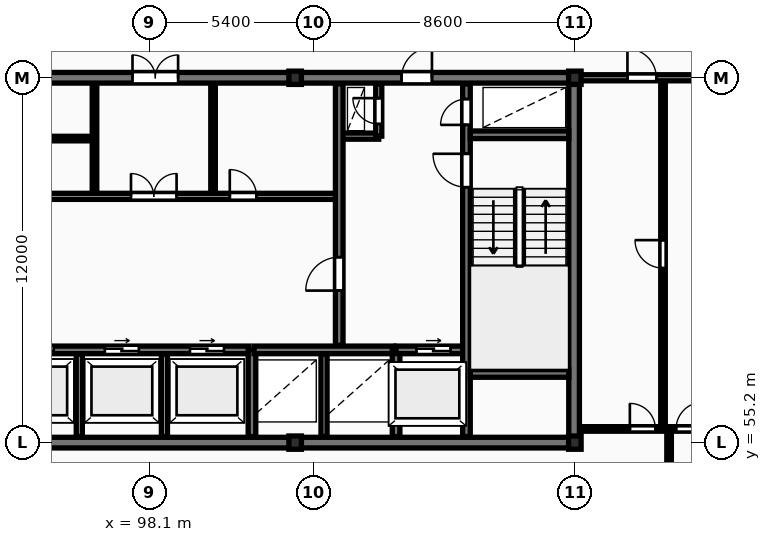
"""IFC4 building model, lengths in metres.
Left out: names, types, materials, properties, quantities, classifications, styles, units other than length and angle.
Written with IfcOpenShell. Run it as: python <this file> out.ifc"""

import sys

from ifc_helpers import new_model, si_unit, direction, frame, frame_2d, origin, origin_2d, place, context, subcontext, project, spatial, rectangle, i_section, extrude, element, fill, save


model = new_model("IFC4")
c1 = context("Model", 3, precision=1e-05, world=origin(), true_north=direction((0.0, 1.0)))
c2 = subcontext(c1, "Body", "Model", "MODEL_VIEW")
j1 = project(units=[si_unit("LENGTHUNIT", "METRE"), si_unit("PLANEANGLEUNIT", "RADIAN")], contexts=[c1])
p1 = place(None, origin())
s1 = spatial("IfcSite", under=j1, at=p1, CompositionType="ELEMENT")
p2 = place(p1, origin())
s2 = spatial("IfcBuilding", under=s1, at=p2, CompositionType="ELEMENT")
p3 = place(p2, frame((0.0, 0.0, 153.7)))
s3 = spatial("IfcBuildingStorey", under=s2, at=p3, CompositionType="ELEMENT", Elevation=153.7)
for number, where, z_axis, x_axis in (
    (1, (102.9, 55.2, 0.0), (0.0, 0.0, 1.0), (1.0, 0.0, 0.0)),
    (2, (102.9, 67.2, 0.0), (0.0, 0.0, 1.0), (1.0, 0.0, 0.0)),
    (3, (112.1, 55.2, 0.0), (0.0, 0.0, 1.0), (1.0, 0.0, 0.0)),
    (4, (112.1, 67.2, 0.0), (0.0, 0.0, 1.0), (1.0, 0.0, 0.0)),
):
    element("IfcColumn", number, at=place(p3, frame(where, z_axis=z_axis, x_axis=x_axis)), inside=s3, PredefinedType="COLUMN", context=c2, shape_type="SweptSolid", body=[
        extrude(i_section(OverallWidth=0.412, OverallDepth=0.437, WebThickness=0.036, FlangeThickness=0.052, FilletRadius=0.015, at=origin_2d()), origin(), (0.0, 0.0, 1.0), 3.6),
    ])
p4 = place(p3, frame((75.95, 55.2, 0.0), z_axis=(0.0, 0.0, 1.0), x_axis=(1.0, 0.0, 0.0)))
e5 = element("IfcWall", 5, at=p4, inside=s3, PredefinedType="SHEAR", context=c2, shape_type="SweptSolid", body=[
    extrude(rectangle(XDim=36.3, YDim=0.35, at=frame_2d((18.15, 0.0))), origin(), (0.0, 0.0, 1.0), 3.6),
])
p5 = place(p4, frame((15.1, 0.0, 0.0)))
e6 = element("IfcOpeningElement", 6, at=p5, cuts=e5, PredefinedType="OPENING", context=c2, shape_type="SweptSolid", body=[
    extrude(rectangle(XDim=1.1, YDim=2.1, at=frame_2d((0.55, 1.05))), frame((0.0, 0.185, 0.0), z_axis=(0.0, -1.0, 0.0), x_axis=(1.0, 0.0, 0.0)), (0.0, 0.0, 1.0), 0.37),
])
p6 = place(p3, frame((112.075, 55.375, 0.0), z_axis=(0.0, 0.0, 1.0), x_axis=(0.0, 1.0, 0.0)))
e7 = element("IfcWall", 7, at=p6, inside=s3, PredefinedType="SHEAR", context=c2, shape_type="SweptSolid", body=[
    extrude(rectangle(XDim=11.65, YDim=0.35, at=frame_2d((5.825, 0.0))), origin(), (0.0, 0.0, 1.0), 3.6),
])
p7 = place(p3, frame((75.95, 67.2, 0.0), z_axis=(0.0, 0.0, 1.0), x_axis=(1.0, 0.0, 0.0)))
e8 = element("IfcWall", 8, at=p7, inside=s3, PredefinedType="SHEAR", context=c2, shape_type="SweptSolid", body=[
    extrude(rectangle(XDim=36.3, YDim=0.35, at=frame_2d((18.15, 0.0))), origin(), (0.0, 0.0, 1.0), 3.6),
])
p8 = place(p7, frame((5.25, 0.0, 0.0)))
e9 = element("IfcOpeningElement", 9, at=p8, cuts=e8, PredefinedType="OPENING", context=c2, shape_type="SweptSolid", body=[
    extrude(rectangle(XDim=1.0, YDim=2.15, at=frame_2d((0.5, 1.075))), frame((0.0, 0.185, 0.0), z_axis=(0.0, -1.0, 0.0), x_axis=(1.0, 0.0, 0.0)), (0.0, 0.0, 1.0), 0.37),
])
p9 = place(p7, frame((21.6, 0.0, 0.0)))
e10 = element("IfcOpeningElement", 10, at=p9, cuts=e8, PredefinedType="OPENING", context=c2, shape_type="SweptSolid", body=[
    extrude(rectangle(XDim=1.5, YDim=2.2, at=frame_2d((0.75, 1.1))), frame((0.0, 0.185, 0.0), z_axis=(0.0, -1.0, 0.0), x_axis=(1.0, 0.0, 0.0)), (0.0, 0.0, 1.0), 0.37),
])
p10 = place(p7, frame((30.45, 0.0, 0.0)))
e11 = element("IfcOpeningElement", 11, at=p10, cuts=e8, PredefinedType="OPENING", context=c2, shape_type="SweptSolid", body=[
    extrude(rectangle(XDim=1.0, YDim=2.15, at=frame_2d((0.5, 1.075))), frame((0.0, 0.185, 0.0), z_axis=(0.0, -1.0, 0.0), x_axis=(1.0, 0.0, 0.0)), (0.0, 0.0, 1.0), 0.37),
])
for number, where, z_axis, x_axis in (
    (12, (95.8, 55.4, 0.0), (0.0, 0.0, 1.0), (0.0, 1.0, 0.0)),
    (13, (98.6, 55.4, 0.0), (0.0, 0.0, 1.0), (0.0, 1.0, 0.0)),
):
    element("IfcWall", number, at=place(p3, frame(where, z_axis=z_axis, x_axis=x_axis)), inside=s3, PredefinedType="PARTITIONING", context=c2, shape_type="SweptSolid", body=[
        extrude(rectangle(XDim=2.72, YDim=0.2, at=frame_2d((1.36, 0.0))), origin(), (0.0, 0.0, 1.0), 3.32),
    ])
p11 = place(p3, frame((93.02, 58.25, 0.0), z_axis=(0.0, 0.0, 1.0), x_axis=(1.0, 0.0, 0.0)))
e14 = element("IfcWall", 14, at=p11, inside=s3, PredefinedType="SHEAR", context=c2, shape_type="SweptSolid", body=[
    extrude(rectangle(XDim=8.36, YDim=0.25, at=frame_2d((4.18, 0.0))), origin(), (0.0, 0.0, 1.0), 3.6),
])
p12 = place(p11, frame((0.82, 0.0, 0.0)))
e15 = element("IfcOpeningElement", 15, at=p12, cuts=e14, PredefinedType="OPENING", context=c2, shape_type="SweptSolid", body=[
    extrude(rectangle(XDim=1.12, YDim=2.12, at=frame_2d((0.56, 1.06))), frame((0.0, 0.135, 0.0), z_axis=(0.0, -1.0, 0.0), x_axis=(1.0, 0.0, 0.0)), (0.0, 0.0, 1.0), 0.27),
])
p13 = place(p11, frame((3.62, 0.0, 0.0)))
e16 = element("IfcOpeningElement", 16, at=p13, cuts=e14, PredefinedType="OPENING", context=c2, shape_type="SweptSolid", body=[
    extrude(rectangle(XDim=1.12, YDim=2.12, at=frame_2d((0.56, 1.06))), frame((0.0, 0.135, 0.0), z_axis=(0.0, -1.0, 0.0), x_axis=(1.0, 0.0, 0.0)), (0.0, 0.0, 1.0), 0.27),
])
p14 = place(p11, frame((6.42, 0.0, 0.0)))
e17 = element("IfcOpeningElement", 17, at=p14, cuts=e14, PredefinedType="OPENING", context=c2, shape_type="SweptSolid", body=[
    extrude(rectangle(XDim=1.12, YDim=2.12, at=frame_2d((0.56, 1.06))), frame((0.0, 0.135, 0.0), z_axis=(0.0, -1.0, 0.0), x_axis=(1.0, 0.0, 0.0)), (0.0, 0.0, 1.0), 0.27),
])
p15 = place(p3, frame((101.48, 55.4, 0.0), z_axis=(0.0, 0.0, 1.0), x_axis=(0.0, 1.0, 0.0)))
e18 = element("IfcWall", 18, at=p15, inside=s3, PredefinedType="SHEAR", context=c2, shape_type="SweptSolid", body=[
    extrude(rectangle(XDim=2.85, YDim=0.25, at=frame_2d((1.425, 0.0))), origin(), (0.0, 0.0, 1.0), 3.6),
])
p16 = place(p3, frame((103.85, 55.4, 0.0), z_axis=(0.0, 0.0, 1.0), x_axis=(0.0, 1.0, 0.0)))
e19 = element("IfcWall", 19, at=p16, inside=s3, PredefinedType="PARTITIONING", context=c2, shape_type="SweptSolid", body=[
    extrude(rectangle(XDim=2.72, YDim=0.2, at=frame_2d((1.36, 0.0))), origin(), (0.0, 0.0, 1.0), 3.32),
])
p17 = place(p3, frame((101.55, 58.25, 0.0), z_axis=(0.0, 0.0, 1.0), x_axis=(1.0, 0.0, 0.0)))
e20 = element("IfcWall", 20, at=p17, inside=s3, PredefinedType="SHEAR", context=c2, shape_type="SweptSolid", body=[
    extrude(rectangle(XDim=4.6, YDim=0.25, at=frame_2d((2.3, 0.0))), origin(), (0.0, 0.0, 1.0), 3.6),
])
p18 = place(p3, frame((106.22, 55.4, 0.0), z_axis=(0.0, 0.0, 1.0), x_axis=(0.0, 1.0, 0.0)))
e21 = element("IfcWall", 21, at=p18, inside=s3, PredefinedType="SHEAR", context=c2, shape_type="SweptSolid", body=[
    extrude(rectangle(XDim=2.85, YDim=0.25, at=frame_2d((1.425, 0.0))), origin(), (0.0, 0.0, 1.0), 3.6),
])
p19 = place(p3, frame((106.22, 58.25, 0.0), z_axis=(0.0, 0.0, 1.0), x_axis=(1.0, 0.0, 0.0)))
e22 = element("IfcWall", 22, at=p19, inside=s3, PredefinedType="SHEAR", context=c2, shape_type="SweptSolid", body=[
    extrude(rectangle(XDim=2.46, YDim=0.25, at=frame_2d((1.23, 0.0))), origin(), (0.0, 0.0, 1.0), 3.6),
])
p20 = place(p19, frame((0.67, 0.0, 0.0)))
e23 = element("IfcOpeningElement", 23, at=p20, cuts=e22, PredefinedType="OPENING", context=c2, shape_type="SweptSolid", body=[
    extrude(rectangle(XDim=1.12, YDim=2.12, at=frame_2d((0.56, 1.06))), frame((0.0, 0.135, 0.0), z_axis=(0.0, -1.0, 0.0), x_axis=(1.0, 0.0, 0.0)), (0.0, 0.0, 1.0), 0.27),
])
p21 = place(p3, frame((89.25, 65.2, 0.0), z_axis=(0.0, 0.0, 1.0), x_axis=(1.0, 0.0, 0.0)))
e24 = element("IfcWall", 24, at=p21, inside=s3, PredefinedType="PARTITIONING", context=c2, shape_type="SweptSolid", body=[
    extrude(rectangle(XDim=7.05, YDim=0.15, at=frame_2d((3.525, 0.0))), origin(), (0.0, 0.0, 1.0), 3.32),
])
p22 = place(p21, frame((1.6, 0.0, 0.0)))
e25 = element("IfcOpeningElement", 25, at=p22, cuts=e24, PredefinedType="OPENING", context=c2, shape_type="SweptSolid", body=[
    extrude(rectangle(XDim=0.88, YDim=2.06, at=frame_2d((0.44, 1.03))), frame((0.0, 0.085, 0.0), z_axis=(0.0, -1.0, 0.0), x_axis=(1.0, 0.0, 0.0)), (0.0, 0.0, 1.0), 0.17),
])
for number, where, z_axis, x_axis in (
    (26, (96.3, 63.4, 0.0), (0.0, 0.0, 1.0), (0.0, 1.0, 0.0)),
    (27, (100.2, 63.4, 0.0), (0.0, 0.0, 1.0), (0.0, 1.0, 0.0)),
):
    element("IfcWall", number, at=place(p3, frame(where, z_axis=z_axis, x_axis=x_axis)), inside=s3, PredefinedType="PARTITIONING", context=c2, shape_type="SweptSolid", body=[
        extrude(rectangle(XDim=3.6, YDim=0.15, at=frame_2d((1.8, 0.0))), origin(), (0.0, 0.0, 1.0), 3.32),
    ])
p23 = place(p3, frame((84.42, 63.3, 0.0), z_axis=(0.0, 0.0, 1.0), x_axis=(1.0, 0.0, 0.0)))
e28 = element("IfcWall", 28, at=p23, inside=s3, PredefinedType="PARTITIONING", context=c2, shape_type="SweptSolid", body=[
    extrude(rectangle(XDim=19.83, YDim=0.2, at=frame_2d((9.915, 0.0))), origin(), (0.0, 0.0, 1.0), 3.32),
])
p24 = place(p23, frame((1.15, 0.0, 0.0)))
e29 = element("IfcOpeningElement", 29, at=p24, cuts=e28, PredefinedType="OPENING", context=c2, shape_type="SweptSolid", body=[
    extrude(rectangle(XDim=0.85, YDim=2.05, at=frame_2d((0.425, 1.025))), frame((0.0, 0.11, 0.0), z_axis=(0.0, -1.0, 0.0), x_axis=(1.0, 0.0, 0.0)), (0.0, 0.0, 1.0), 0.22),
])
p25 = place(p23, frame((3.25, 0.0, 0.0)))
e30 = element("IfcOpeningElement", 30, at=p25, cuts=e28, PredefinedType="OPENING", context=c2, shape_type="SweptSolid", body=[
    extrude(rectangle(XDim=0.85, YDim=2.05, at=frame_2d((0.425, 1.025))), frame((0.0, 0.11, 0.0), z_axis=(0.0, -1.0, 0.0), x_axis=(1.0, 0.0, 0.0)), (0.0, 0.0, 1.0), 0.22),
])
p26 = place(p23, frame((13.08, 0.0, 0.0)))
e31 = element("IfcOpeningElement", 31, at=p26, cuts=e28, PredefinedType="OPENING", context=c2, shape_type="SweptSolid", body=[
    extrude(rectangle(XDim=1.5, YDim=2.2, at=frame_2d((0.75, 1.1))), frame((0.0, 0.11, 0.0), z_axis=(0.0, -1.0, 0.0), x_axis=(1.0, 0.0, 0.0)), (0.0, 0.0, 1.0), 0.22),
])
p27 = place(p23, frame((6.68, 0.0, 0.0)))
e32 = element("IfcOpeningElement", 32, at=p27, cuts=e28, PredefinedType="OPENING", context=c2, shape_type="SweptSolid", body=[
    extrude(rectangle(XDim=0.92, YDim=2.08, at=frame_2d((0.46, 1.04))), frame((0.0, 0.11, 0.0), z_axis=(0.0, -1.0, 0.0), x_axis=(1.0, 0.0, 0.0)), (0.0, 0.0, 1.0), 0.22),
])
p28 = place(p23, frame((16.33, 0.0, 0.0)))
e33 = element("IfcOpeningElement", 33, at=p28, cuts=e28, PredefinedType="OPENING", context=c2, shape_type="SweptSolid", body=[
    extrude(rectangle(XDim=0.88, YDim=2.06, at=frame_2d((0.44, 1.03))), frame((0.0, 0.11, 0.0), z_axis=(0.0, -1.0, 0.0), x_axis=(1.0, 0.0, 0.0)), (0.0, 0.0, 1.0), 0.22),
])
p29 = place(p3, frame((104.45, 65.28, 0.0), z_axis=(0.0, 0.0, 1.0), x_axis=(1.0, 0.0, 0.0)))
e34 = element("IfcWall", 34, at=p29, inside=s3, PredefinedType="PARTITIONING", context=c2, shape_type="SweptSolid", body=[
    extrude(rectangle(XDim=1.2, YDim=0.2, at=frame_2d((0.6, 0.0))), origin(), (0.0, 0.0, 1.0), 3.32),
])
p30 = place(p3, frame((105.65, 65.28, 0.0), z_axis=(0.0, 0.0, 1.0), x_axis=(0.0, 1.0, 0.0)))
e35 = element("IfcWall", 35, at=p30, inside=s3, PredefinedType="PARTITIONING", context=c2, shape_type="SweptSolid", body=[
    extrude(rectangle(XDim=1.72, YDim=0.2, at=frame_2d((0.86, 0.0))), origin(), (0.0, 0.0, 1.0), 3.32),
])
p31 = place(p30, frame((0.4, 0.0, 0.0)))
e36 = element("IfcOpeningElement", 36, at=p31, cuts=e35, PredefinedType="OPENING", context=c2, shape_type="SweptSolid", body=[
    extrude(rectangle(XDim=0.85, YDim=2.05, at=frame_2d((0.425, 1.025))), frame((0.0, 0.11, 0.0), z_axis=(0.0, -1.0, 0.0), x_axis=(1.0, 0.0, 0.0)), (0.0, 0.0, 1.0), 0.22),
])
p32 = place(p3, frame((104.35, 58.4, 0.0), z_axis=(0.0, 0.0, 1.0), x_axis=(0.0, 1.0, 0.0)))
e37 = element("IfcWall", 37, at=p32, inside=s3, PredefinedType="SHEAR", context=c2, shape_type="SweptSolid", body=[
    extrude(rectangle(XDim=8.6, YDim=0.25, at=frame_2d((4.3, 0.0))), origin(), (0.0, 0.0, 1.0), 3.6),
])
p33 = place(p32, frame((1.8, 0.0, 0.0)))
e38 = element("IfcOpeningElement", 38, at=p33, cuts=e37, PredefinedType="OPENING", context=c2, shape_type="SweptSolid", body=[
    extrude(rectangle(XDim=1.1, YDim=2.1, at=frame_2d((0.55, 1.05))), frame((0.0, 0.135, 0.0), z_axis=(0.0, -1.0, 0.0), x_axis=(1.0, 0.0, 0.0)), (0.0, 0.0, 1.0), 0.27),
])
p34 = place(p3, frame((108.535, 55.4, 0.0), z_axis=(0.0, 0.0, 1.0), x_axis=(0.0, 1.0, 0.0)))
e39 = element("IfcWall", 39, at=p34, inside=s3, PredefinedType="SHEAR", context=c2, shape_type="SweptSolid", body=[
    extrude(rectangle(XDim=11.6, YDim=0.25, at=frame_2d((5.8, 0.0))), origin(), (0.0, 0.0, 1.0), 3.6),
])
p35 = place(p34, frame((8.2, 0.0, 0.0)))
e40 = element("IfcOpeningElement", 40, at=p35, cuts=e39, PredefinedType="OPENING", context=c2, shape_type="SweptSolid", body=[
    extrude(rectangle(XDim=1.1, YDim=2.1, at=frame_2d((0.55, 1.05))), frame((0.0, 0.135, 0.0), z_axis=(0.0, -1.0, 0.0), x_axis=(1.0, 0.0, 0.0)), (0.0, 0.0, 1.0), 0.27),
])
p36 = place(p34, frame((10.25, 0.0, 0.0)))
e41 = element("IfcOpeningElement", 41, at=p36, cuts=e39, PredefinedType="OPENING", context=c2, shape_type="SweptSolid", body=[
    extrude(rectangle(XDim=0.85, YDim=2.05, at=frame_2d((0.425, 1.025))), frame((0.0, 0.135, 0.0), z_axis=(0.0, -1.0, 0.0), x_axis=(1.0, 0.0, 0.0)), (0.0, 0.0, 1.0), 0.27),
])
for number, where, z_axis, x_axis in (
    (42, (108.66, 57.475, 0.0), (0.0, 0.0, 1.0), (1.0, 0.0, 0.0)),
    (43, (108.66, 65.325, 0.0), (0.0, 0.0, 1.0), (1.0, 0.0, 0.0)),
):
    element("IfcWall", number, at=place(p3, frame(where, z_axis=z_axis, x_axis=x_axis)), inside=s3, PredefinedType="SHEAR", context=c2, shape_type="SweptSolid", body=[
        extrude(rectangle(XDim=3.24, YDim=0.25, at=frame_2d((1.62, 0.0))), origin(), (0.0, 0.0, 1.0), 3.6),
    ])
p37 = place(p3, frame((115.0, 55.65, 0.0), z_axis=(0.0, 0.0, 1.0), x_axis=(0.0, 1.0, 0.0)))
e44 = element("IfcWall", 44, at=p37, inside=s3, PredefinedType="PARTITIONING", context=c2, shape_type="SweptSolid", body=[
    extrude(rectangle(XDim=11.5, YDim=0.15, at=frame_2d((5.75, 0.0))), origin(), (0.0, 0.0, 1.0), 3.32),
])
p38 = place(p37, frame((5.29, 0.0, 0.0)))
e45 = element("IfcOpeningElement", 45, at=p38, cuts=e44, PredefinedType="OPENING", context=c2, shape_type="SweptSolid", body=[
    extrude(rectangle(XDim=0.92, YDim=2.08, at=frame_2d((0.46, 1.04))), frame((0.0, 0.085, 0.0), z_axis=(0.0, -1.0, 0.0), x_axis=(1.0, 0.0, 0.0)), (0.0, 0.0, 1.0), 0.17),
])
p39 = place(p3, frame((115.2, 51.1, 0.0), z_axis=(0.0, 0.0, 1.0), x_axis=(0.0, 1.0, 0.0)))
e46 = element("IfcWall", 46, at=p39, inside=s3, PredefinedType="PARTITIONING", context=c2, shape_type="SweptSolid", body=[
    extrude(rectangle(XDim=4.55, YDim=0.15, at=frame_2d((2.275, 0.0))), origin(), (0.0, 0.0, 1.0), 3.32),
])
p40 = place(p3, frame((112.27, 55.65, 0.0), z_axis=(0.0, 0.0, 1.0), x_axis=(1.0, 0.0, 0.0)))
e47 = element("IfcWall", 47, at=p40, inside=s3, PredefinedType="PARTITIONING", context=c2, shape_type="SweptSolid", body=[
    extrude(rectangle(XDim=6.76, YDim=0.15, at=frame_2d((3.38, 0.0))), origin(), (0.0, 0.0, 1.0), 3.32),
])
p41 = place(p40, frame((1.64, 0.0, 0.0)))
e48 = element("IfcOpeningElement", 48, at=p41, cuts=e47, PredefinedType="OPENING", context=c2, shape_type="SweptSolid", body=[
    extrude(rectangle(XDim=0.84, YDim=2.04, at=frame_2d((0.42, 1.02))), frame((0.0, 0.085, 0.0), z_axis=(0.0, -1.0, 0.0), x_axis=(1.0, 0.0, 0.0)), (0.0, 0.0, 1.0), 0.17),
])
p42 = place(p40, frame((3.16, 0.0, 0.0)))
e49 = element("IfcOpeningElement", 49, at=p42, cuts=e47, PredefinedType="OPENING", context=c2, shape_type="SweptSolid", body=[
    extrude(rectangle(XDim=0.88, YDim=2.06, at=frame_2d((0.44, 1.03))), frame((0.0, 0.085, 0.0), z_axis=(0.0, -1.0, 0.0), x_axis=(1.0, 0.0, 0.0)), (0.0, 0.0, 1.0), 0.17),
])
p43 = place(p3, frame((112.25, 67.2, 0.0), z_axis=(0.0, 0.0, 1.0), x_axis=(1.0, 0.0, 0.0)))
e50 = element("IfcWall", 50, at=p43, inside=s3, PredefinedType="PARTITIONING", context=c2, shape_type="SweptSolid", body=[
    extrude(rectangle(XDim=18.35, YDim=0.2, at=frame_2d((9.175, 0.0))), origin(), (0.0, 0.0, 1.0), 2.783),
])
p44 = place(p43, frame((1.58, 0.0, 0.0)))
e51 = element("IfcOpeningElement", 51, at=p44, cuts=e50, PredefinedType="OPENING", context=c2, shape_type="SweptSolid", body=[
    extrude(rectangle(XDim=0.95, YDim=2.15, at=frame_2d((0.475, 1.075))), frame((0.0, 0.11, 0.0), z_axis=(0.0, -1.0, 0.0), x_axis=(1.0, 0.0, 0.0)), (0.0, 0.0, 1.0), 0.22),
])
p45 = place(p9, origin())
e52 = element("IfcDoor", 52, at=p45, inside=s3, OperationType="DOUBLE_DOOR_SINGLE_SWING", PredefinedType="DOOR", context=c2, shape_type="SweptSolid", body=[
    extrude(rectangle(XDim=1.5, YDim=2.2, at=frame_2d((0.75, 1.1))), frame((0.0, 0.025, 0.0), z_axis=(0.0, -1.0, 0.0), x_axis=(1.0, 0.0, 0.0)), (0.0, 0.0, 1.0), 0.05),
])
fill(e10, e52)
p46 = place(p10, origin())
e53 = element("IfcDoor", 53, at=p46, inside=s3, OperationType="SINGLE_SWING_RIGHT", PredefinedType="DOOR", context=c2, shape_type="SweptSolid", body=[
    extrude(rectangle(XDim=1.0, YDim=2.15, at=frame_2d((0.5, 1.075))), frame((0.0, 0.025, 0.0), z_axis=(0.0, -1.0, 0.0), x_axis=(1.0, 0.0, 0.0)), (0.0, 0.0, 1.0), 0.05),
])
fill(e11, e53)
p47 = place(p12, origin())
e54 = element("IfcDoor", 54, at=p47, inside=s3, OperationType="SLIDING_TO_RIGHT", PredefinedType="DOOR", context=c2, shape_type="SweptSolid", body=[
    extrude(rectangle(XDim=1.12, YDim=2.12, at=frame_2d((0.56, 1.06))), frame((0.0, 0.025, 0.0), z_axis=(0.0, -1.0, 0.0), x_axis=(1.0, 0.0, 0.0)), (0.0, 0.0, 1.0), 0.05),
])
fill(e15, e54)
p48 = place(p13, origin())
e55 = element("IfcDoor", 55, at=p48, inside=s3, OperationType="SLIDING_TO_RIGHT", PredefinedType="DOOR", context=c2, shape_type="SweptSolid", body=[
    extrude(rectangle(XDim=1.12, YDim=2.12, at=frame_2d((0.56, 1.06))), frame((0.0, 0.025, 0.0), z_axis=(0.0, -1.0, 0.0), x_axis=(1.0, 0.0, 0.0)), (0.0, 0.0, 1.0), 0.05),
])
fill(e16, e55)
p49 = place(p14, origin())
e56 = element("IfcDoor", 56, at=p49, inside=s3, OperationType="SLIDING_TO_RIGHT", PredefinedType="DOOR", context=c2, shape_type="SweptSolid", body=[
    extrude(rectangle(XDim=1.12, YDim=2.12, at=frame_2d((0.56, 1.06))), frame((0.0, 0.025, 0.0), z_axis=(0.0, -1.0, 0.0), x_axis=(1.0, 0.0, 0.0)), (0.0, 0.0, 1.0), 0.05),
])
fill(e17, e56)
p50 = place(p20, origin())
e57 = element("IfcDoor", 57, at=p50, inside=s3, OperationType="SLIDING_TO_RIGHT", PredefinedType="DOOR", context=c2, shape_type="SweptSolid", body=[
    extrude(rectangle(XDim=1.12, YDim=2.12, at=frame_2d((0.56, 1.06))), frame((0.0, 0.025, 0.0), z_axis=(0.0, -1.0, 0.0), x_axis=(1.0, 0.0, 0.0)), (0.0, 0.0, 1.0), 0.05),
])
fill(e23, e57)
p51 = place(p26, origin())
e58 = element("IfcDoor", 58, at=p51, inside=s3, OperationType="DOUBLE_DOOR_SINGLE_SWING", PredefinedType="DOOR", context=c2, shape_type="SweptSolid", body=[
    extrude(rectangle(XDim=1.5, YDim=2.2, at=frame_2d((0.75, 1.1))), frame((0.0, 0.025, 0.0), z_axis=(0.0, -1.0, 0.0), x_axis=(1.0, 0.0, 0.0)), (0.0, 0.0, 1.0), 0.05),
])
fill(e31, e58)
p52 = place(p28, origin())
e59 = element("IfcDoor", 59, at=p52, inside=s3, OperationType="SINGLE_SWING_LEFT", PredefinedType="DOOR", context=c2, shape_type="SweptSolid", body=[
    extrude(rectangle(XDim=0.88, YDim=2.06, at=frame_2d((0.44, 1.03))), frame((0.0, 0.025, 0.0), z_axis=(0.0, -1.0, 0.0), x_axis=(1.0, 0.0, 0.0)), (0.0, 0.0, 1.0), 0.05),
])
fill(e33, e59)
p53 = place(p31, origin())
e60 = element("IfcDoor", 60, at=p53, inside=s3, OperationType="SINGLE_SWING_RIGHT", PredefinedType="DOOR", context=c2, shape_type="SweptSolid", body=[
    extrude(rectangle(XDim=0.85, YDim=2.05, at=frame_2d((0.425, 1.025))), frame((0.0, 0.025, 0.0), z_axis=(0.0, -1.0, 0.0), x_axis=(1.0, 0.0, 0.0)), (0.0, 0.0, 1.0), 0.05),
])
fill(e36, e60)
p54 = place(p33, origin())
e61 = element("IfcDoor", 61, at=p54, inside=s3, OperationType="SINGLE_SWING_LEFT", PredefinedType="DOOR", context=c2, shape_type="SweptSolid", body=[
    extrude(rectangle(XDim=1.1, YDim=2.1, at=frame_2d((0.55, 1.05))), frame((0.0, 0.025, 0.0), z_axis=(0.0, -1.0, 0.0), x_axis=(1.0, 0.0, 0.0)), (0.0, 0.0, 1.0), 0.05),
])
fill(e38, e61)
p55 = place(p35, origin())
e62 = element("IfcDoor", 62, at=p55, inside=s3, OperationType="SINGLE_SWING_RIGHT", PredefinedType="DOOR", context=c2, shape_type="SweptSolid", body=[
    extrude(rectangle(XDim=1.1, YDim=2.1, at=frame_2d((0.55, 1.05))), frame((0.0, 0.025, 0.0), z_axis=(0.0, -1.0, 0.0), x_axis=(1.0, 0.0, 0.0)), (0.0, 0.0, 1.0), 0.05),
])
fill(e40, e62)
p56 = place(p36, origin())
e63 = element("IfcDoor", 63, at=p56, inside=s3, OperationType="SINGLE_SWING_LEFT", PredefinedType="DOOR", context=c2, shape_type="SweptSolid", body=[
    extrude(rectangle(XDim=0.85, YDim=2.05, at=frame_2d((0.425, 1.025))), frame((0.0, 0.025, 0.0), z_axis=(0.0, -1.0, 0.0), x_axis=(1.0, 0.0, 0.0)), (0.0, 0.0, 1.0), 0.05),
])
fill(e41, e63)
p57 = place(p38, origin())
e64 = element("IfcDoor", 64, at=p57, inside=s3, OperationType="SINGLE_SWING_RIGHT", PredefinedType="DOOR", context=c2, shape_type="SweptSolid", body=[
    extrude(rectangle(XDim=0.92, YDim=2.08, at=frame_2d((0.46, 1.04))), frame((0.0, 0.025, 0.0), z_axis=(0.0, -1.0, 0.0), x_axis=(1.0, 0.0, 0.0)), (0.0, 0.0, 1.0), 0.05),
])
fill(e45, e64)
p58 = place(p41, origin())
e65 = element("IfcDoor", 65, at=p58, inside=s3, OperationType="SINGLE_SWING_LEFT", PredefinedType="DOOR", context=c2, shape_type="SweptSolid", body=[
    extrude(rectangle(XDim=0.84, YDim=2.04, at=frame_2d((0.42, 1.02))), frame((0.0, 0.025, 0.0), z_axis=(0.0, -1.0, 0.0), x_axis=(1.0, 0.0, 0.0)), (0.0, 0.0, 1.0), 0.05),
])
fill(e48, e65)
p59 = place(p42, origin())
e66 = element("IfcDoor", 66, at=p59, inside=s3, OperationType="SINGLE_SWING_RIGHT", PredefinedType="DOOR", context=c2, shape_type="SweptSolid", body=[
    extrude(rectangle(XDim=0.88, YDim=2.06, at=frame_2d((0.44, 1.03))), frame((0.0, 0.025, 0.0), z_axis=(0.0, -1.0, 0.0), x_axis=(1.0, 0.0, 0.0)), (0.0, 0.0, 1.0), 0.05),
])
fill(e49, e66)
p60 = place(p44, origin())
e67 = element("IfcDoor", 67, at=p60, inside=s3, OperationType="SINGLE_SWING_LEFT", PredefinedType="DOOR", context=c2, shape_type="SweptSolid", body=[
    extrude(rectangle(XDim=0.95, YDim=2.15, at=frame_2d((0.475, 1.075))), frame((0.0, 0.025, 0.0), z_axis=(0.0, -1.0, 0.0), x_axis=(1.0, 0.0, 0.0)), (0.0, 0.0, 1.0), 0.05),
])
fill(e51, e67)
save(model, sys.argv[1])
